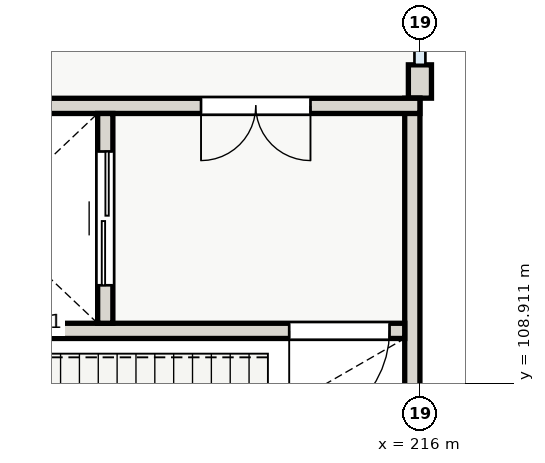
"""IFC4 building model, lengths in metres.
Left out: names, types, materials, properties, quantities, classifications, styles, units other than length and angle.
Written with IfcOpenShell. Run it as: python <this file> out.ifc"""

import sys

from ifc_helpers import new_model, si_unit, direction, frame, frame_2d, origin, place, context, subcontext, project, spatial, rectangle, extrude, element, fill, save


model = new_model("IFC4")
c1 = context("Model", 3, precision=1e-05, world=origin(), true_north=direction((0.0, 1.0)))
c2 = subcontext(c1, "Body", "Model", "MODEL_VIEW")
j1 = project(units=[si_unit("LENGTHUNIT", "METRE"), si_unit("PLANEANGLEUNIT", "RADIAN")], contexts=[c1])
p1 = place(None, origin())
s1 = spatial("IfcSite", under=j1, at=p1, CompositionType="ELEMENT")
p2 = place(p1, origin())
s2 = spatial("IfcBuilding", under=s1, at=p2, CompositionType="ELEMENT")
p3 = place(p2, frame((0.0, 0.0, 8.4)))
s3 = spatial("IfcBuildingStorey", under=s2, at=p3, CompositionType="ELEMENT", Elevation=8.4)
p4 = place(p3, frame((216.0, 114.15, 0.0), z_axis=(0.0, 0.0, 1.0), x_axis=(0.0, -1.0, 0.0)))
e1 = element("IfcWall", 1, at=p4, inside=s3, PredefinedType="SOLIDWALL", context=c2, shape_type="SweptSolid", body=[
    extrude(rectangle(XDim=0.548, YDim=0.38, at=frame_2d((0.274, 0.0))), origin(), (0.0, 0.0, 1.0), 3.35),
])
p5 = place(p3, frame((215.875, 113.6, 0.0), z_axis=(0.0, 0.0, 1.0), x_axis=(0.0, -1.0, 0.0)))
e2 = element("IfcWall", 2, at=p5, inside=s3, PredefinedType="SHEAR", context=c2, shape_type="SweptSolid", body=[
    extrude(rectangle(XDim=9.2, YDim=0.25, at=frame_2d((4.6, 0.0))), origin(), (0.0, 0.0, 1.0), 4.2),
])
p6 = place(p3, frame((216.0, 113.475, 0.0), z_axis=(0.0, 0.0, 1.0), x_axis=(-1.0, 0.0, 0.0)))
e3 = element("IfcWall", 3, at=p6, inside=s3, PredefinedType="SHEAR", context=c2, shape_type="SweptSolid", body=[
    extrude(rectangle(XDim=9.2, YDim=0.25, at=frame_2d((4.6, 0.0))), origin(), (0.0, 0.0, 1.0), 4.2),
])
p7 = place(p6, frame((1.8, 0.0, 0.0)))
e4 = element("IfcOpeningElement", 4, at=p7, cuts=e3, PredefinedType="OPENING", context=c2, shape_type="SweptSolid", body=[
    extrude(rectangle(XDim=1.8, YDim=2.15, at=frame_2d((0.9, 1.075))), frame((0.0, 0.135, 0.0), z_axis=(0.0, -1.0, 0.0), x_axis=(1.0, 0.0, 0.0)), (0.0, 0.0, 1.0), 0.27),
])
p8 = place(p3, frame((215.75, 109.775, 0.0), z_axis=(0.0, 0.0, 1.0), x_axis=(-1.0, 0.0, 0.0)))
e5 = element("IfcWall", 5, at=p8, inside=s3, PredefinedType="SHEAR", context=c2, shape_type="SweptSolid", body=[
    extrude(rectangle(XDim=8.7, YDim=0.25, at=frame_2d((4.35, 0.0))), origin(), (0.0, 0.0, 1.0), 4.2),
])
p9 = place(p8, frame((0.25, 0.0, 0.0)))
e6 = element("IfcOpeningElement", 6, at=p9, cuts=e5, PredefinedType="OPENING", context=c2, shape_type="SweptSolid", body=[
    extrude(rectangle(XDim=1.65, YDim=2.1, at=frame_2d((0.825, 1.05))), frame((0.0, 0.135, 0.0), z_axis=(0.0, -1.0, 0.0), x_axis=(1.0, 0.0, 0.0)), (0.0, 0.0, 1.0), 0.27),
])
p10 = place(p3, frame((210.825, 109.9, 0.0), z_axis=(0.0, 0.0, 1.0), x_axis=(0.0, 1.0, 0.0)))
e7 = element("IfcWall", 7, at=p10, inside=s3, PredefinedType="SHEAR", context=c2, shape_type="SweptSolid", body=[
    extrude(rectangle(XDim=3.45, YDim=0.25, at=frame_2d((1.725, 0.0))), origin(), (0.0, 0.0, 1.0), 4.2),
])
p11 = place(p10, frame((0.625, 0.0, 0.0)))
e8 = element("IfcOpeningElement", 8, at=p11, cuts=e7, PredefinedType="OPENING", context=c2, shape_type="SweptSolid", body=[
    extrude(rectangle(XDim=2.2, YDim=2.35, at=frame_2d((1.1, 1.175))), frame((0.0, 0.135, 0.0), z_axis=(0.0, -1.0, 0.0), x_axis=(1.0, 0.0, 0.0)), (0.0, 0.0, 1.0), 0.27),
])
p12 = place(p7, origin())
e9 = element("IfcDoor", 9, at=p12, inside=s3, OperationType="DOUBLE_DOOR_SINGLE_SWING", PredefinedType="DOOR", context=c2, shape_type="SweptSolid", body=[
    extrude(rectangle(XDim=1.8, YDim=2.15, at=frame_2d((0.9, 1.075))), frame((0.0, 0.025, 0.0), z_axis=(0.0, -1.0, 0.0), x_axis=(1.0, 0.0, 0.0)), (0.0, 0.0, 1.0), 0.05),
])
fill(e4, e9)
p13 = place(p9, origin())
e10 = element("IfcDoor", 10, at=p13, inside=s3, OperationType="SINGLE_SWING_RIGHT", PredefinedType="DOOR", context=c2, shape_type="SweptSolid", body=[
    extrude(rectangle(XDim=1.65, YDim=2.1, at=frame_2d((0.825, 1.05))), frame((0.0, 0.025, 0.0), z_axis=(0.0, -1.0, 0.0), x_axis=(1.0, 0.0, 0.0)), (0.0, 0.0, 1.0), 0.05),
])
fill(e6, e10)
p14 = place(p11, origin())
e11 = element("IfcDoor", 11, at=p14, inside=s3, OperationType="SLIDING_TO_LEFT", PredefinedType="DOOR", context=c2, shape_type="SweptSolid", body=[
    extrude(rectangle(XDim=2.2, YDim=2.35, at=frame_2d((1.1, 1.175))), frame((0.0, 0.025, 0.0), z_axis=(0.0, -1.0, 0.0), x_axis=(1.0, 0.0, 0.0)), (0.0, 0.0, 1.0), 0.05),
])
fill(e8, e11)
save(model, sys.argv[1])
